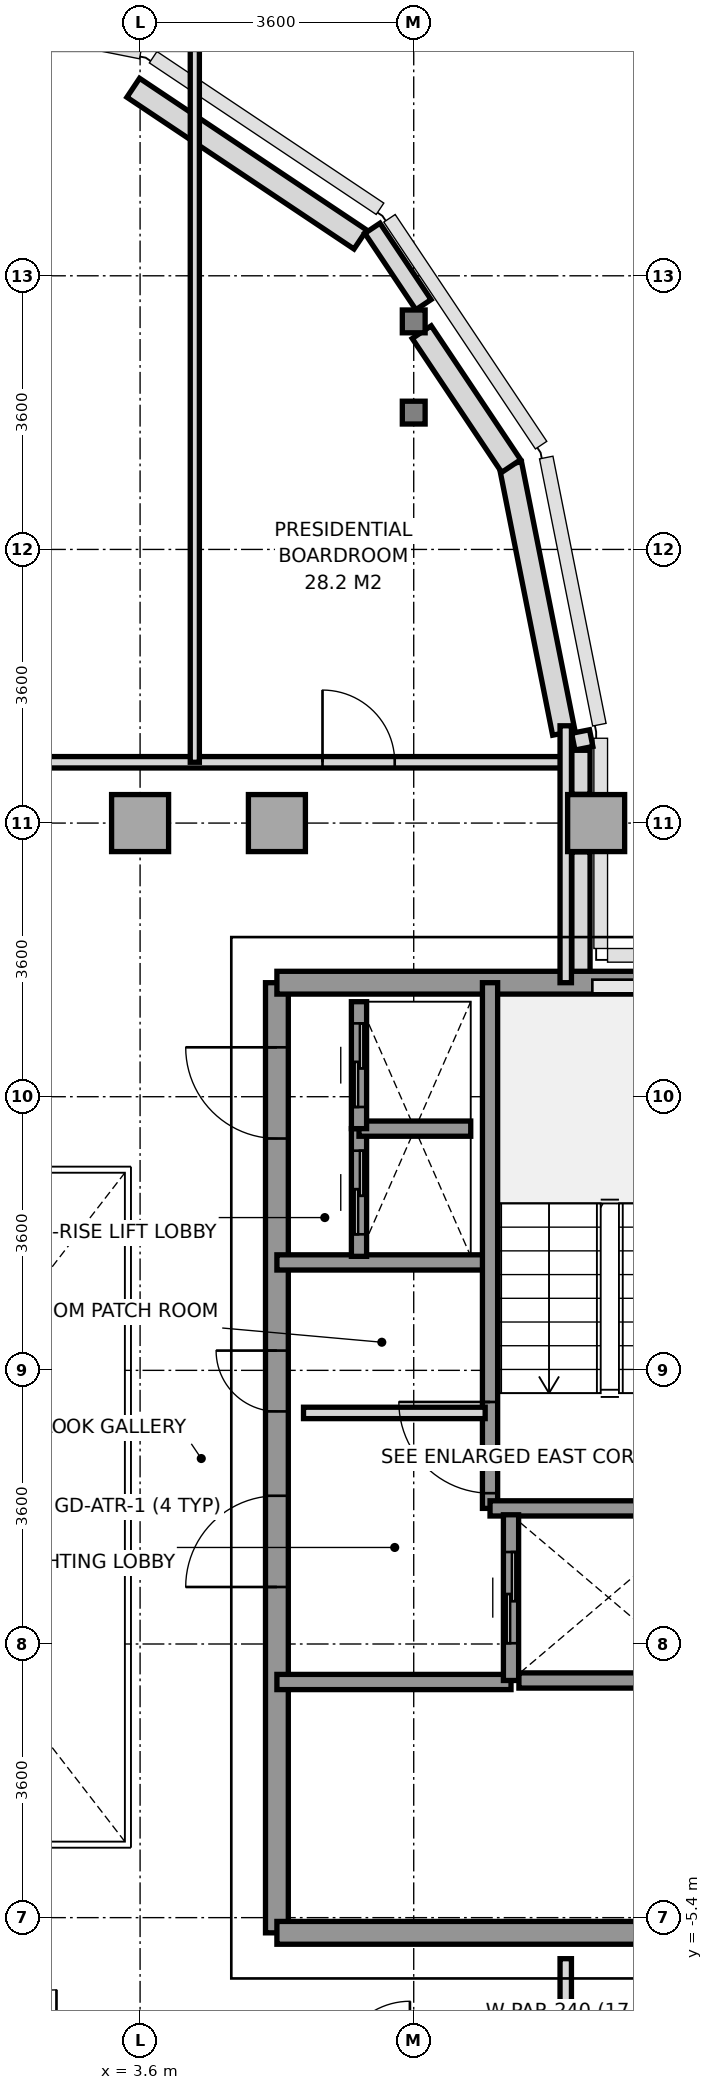
"""IFC4 building model, lengths in metres.
Left out: names, types, materials, properties, quantities, classifications, styles, units other than length and angle.
Written with IfcOpenShell. Run it as: python <this file> out.ifc"""

import sys

from ifc_helpers import new_model, si_unit, direction, frame, frame_2d, origin, origin_2d, place, context, subcontext, project, spatial, rectangle, i_section, extrude, source, transform, mapped, element, fill, save


model = new_model("IFC4")
c1 = context("Model", 3, precision=1e-05, world=origin(), true_north=direction((0.0, 1.0)))
c2 = subcontext(c1, "Body", "Model", "MODEL_VIEW")
j1 = project(units=[si_unit("LENGTHUNIT", "METRE"), si_unit("PLANEANGLEUNIT", "RADIAN")], contexts=[c1])
p1 = place(None, origin())
s1 = spatial("IfcSite", under=j1, at=p1, CompositionType="ELEMENT")
p2 = place(p1, origin())
s2 = spatial("IfcBuilding", under=s1, at=p2, CompositionType="ELEMENT")
p3 = place(p2, frame((0.0, 0.0, 268.4)))
s3 = spatial("IfcBuildingStorey", under=s2, at=p3, CompositionType="ELEMENT", Elevation=268.4)
m1 = source(origin(), c2, "Body", "SweptSolid", [
    extrude(rectangle(XDim=0.75, YDim=0.75, at=origin_2d()), origin(), (0.0, 0.0, 1.0), 2.96),
])
for number, where, z_axis, x_axis in (
    (1, (3.6, 9.0, 0.0), (0.0, 0.0, 1.0), (1.0, 0.0, 0.0)),
    (2, (5.4, 9.0, 0.0), (0.0, 0.0, 1.0), (1.0, 0.0, 0.0)),
):
    element("IfcColumn", number, at=place(p3, frame(where, z_axis=z_axis, x_axis=x_axis)), inside=s3, PredefinedType="COLUMN", context=c2, shape_type="MappedRepresentation", body=[
        mapped(m1, transform((0.0, 0.0, 0.0), x_axis=(1.0, 0.0, 0.0), y_axis=(0.0, 1.0, 0.0), z_axis=(0.0, 0.0, 1.0), scale=1.0)),
    ])
m2 = source(origin(), c2, "Body", "SweptSolid", [
    extrude(i_section(OverallWidth=0.3, OverallDepth=0.3, WebThickness=0.011, FlangeThickness=0.019, at=origin_2d()), origin(), (0.0, 0.0, 1.0), 2.96),
])
for number, where, z_axis, x_axis in (
    (3, (7.2, 14.4, 0.0), (0.0, 0.0, 1.0), (1.0, 0.0, 0.0)),
    (4, (7.2, 15.6, 0.0), (0.0, 0.0, 1.0), (1.0, 0.0, 0.0)),
):
    element("IfcColumn", number, at=place(p3, frame(where, z_axis=z_axis, x_axis=x_axis)), inside=s3, PredefinedType="COLUMN", context=c2, shape_type="MappedRepresentation", body=[
        mapped(m2, transform((0.0, 0.0, 0.0), x_axis=(1.0, 0.0, 0.0), y_axis=(0.0, 1.0, 0.0), z_axis=(0.0, 0.0, 1.0), scale=1.0)),
    ])
p4 = place(p3, frame((9.6, 9.0, 0.0), z_axis=(0.0, 0.0, 1.0), x_axis=(1.0, 0.0, 0.0)))
e5 = element("IfcColumn", 5, at=p4, inside=s3, PredefinedType="COLUMN", context=c2, shape_type="MappedRepresentation", body=[
    mapped(m1, transform((0.0, 0.0, 0.0), x_axis=(1.0, 0.0, 0.0), y_axis=(0.0, 1.0, 0.0), z_axis=(0.0, 0.0, 1.0), scale=1.0)),
])
p5 = place(p3, frame((9.175, 10.185, 0.0), z_axis=(0.0, 0.0, 1.0), x_axis=(-0.195114232679, 0.980780523974, 0.0)))
e6 = element("IfcWall", 6, at=p5, inside=s3, PredefinedType="SOLIDWALL", context=c2, shape_type="SweptSolid", body=[
    extrude(rectangle(XDim=3.609, YDim=0.3, at=frame_2d((1.804, 0.0))), origin(), (0.0, 0.0, 1.0), 2.96),
])
p6 = place(p3, frame((8.482, 13.698, 0.0), z_axis=(0.0, 0.0, 1.0), x_axis=(-0.555604299396, 0.831446848868, 0.0)))
e7 = element("IfcWall", 7, at=p6, inside=s3, PredefinedType="SOLIDWALL", context=c2, shape_type="SweptSolid", body=[
    extrude(rectangle(XDim=2.118, YDim=0.3, at=frame_2d((1.059, 0.0))), origin(), (0.0, 0.0, 1.0), 2.56),
])
p7 = place(p3, frame((6.498, 16.677, 0.0), z_axis=(0.0, 0.0, 1.0), x_axis=(-0.831443568068, 0.555609208993, 0.0)))
e8 = element("IfcWall", 8, at=p7, inside=s3, PredefinedType="SOLIDWALL", context=c2, shape_type="SweptSolid", body=[
    extrude(rectangle(XDim=3.594, YDim=0.3, at=frame_2d((1.797, 0.0))), origin(), (0.0, 0.0, 1.0), 2.96),
])
p8 = place(p3, frame((6.656, 16.825, 0.0), z_axis=(0.0, 0.0, 1.0), x_axis=(0.555585388542, -0.831459485506, 0.0)))
e9 = element("IfcWall", 9, at=p8, inside=s3, PredefinedType="PARAPET", context=c2, shape_type="SweptSolid", body=[
    extrude(rectangle(XDim=1.209, YDim=0.24, at=frame_2d((0.604, 0.0))), origin(), (0.0, 0.0, 1.0), 1.15),
])
p9 = place(p3, frame((9.395, 10.204, 0.0), z_axis=(0.0, 0.0, 1.0), x_axis=(0.194859894132, -0.980831087221, 0.0)))
e10 = element("IfcWall", 10, at=p9, inside=s3, PredefinedType="PARAPET", context=c2, shape_type="SweptSolid", body=[
    extrude(rectangle(XDim=0.224, YDim=0.24, at=frame_2d((0.112, 0.0))), origin(), (0.0, 0.0, 1.0), 1.15),
])
p10 = place(p3, frame((9.4, 9.958, 0.0), z_axis=(0.0, 0.0, 1.0), x_axis=(0.0, -1.0, 0.0)))
e11 = element("IfcWall", 11, at=p10, inside=s3, PredefinedType="PARAPET", context=c2, shape_type="SweptSolid", body=[
    extrude(rectangle(XDim=0.58, YDim=0.24, at=frame_2d((0.29, 0.0))), origin(), (0.0, 0.0, 1.0), 1.15),
])
p11 = place(p3, frame((9.4, 8.622, 0.0), z_axis=(0.0, 0.0, 1.0), x_axis=(0.0, -1.0, 0.0)))
e12 = element("IfcWall", 12, at=p11, inside=s3, PredefinedType="PARAPET", context=c2, shape_type="SweptSolid", body=[
    extrude(rectangle(XDim=1.669, YDim=0.24, at=frame_2d((0.834, 0.0))), origin(), (0.0, 0.0, 1.0), 1.15),
])
p12 = place(p3, frame((5.4, -5.6, 0.0), z_axis=(0.0, 0.0, 1.0), x_axis=(0.0, 1.0, 0.0)))
e13 = element("IfcWall", 13, at=p12, inside=s3, PredefinedType="SHEAR", context=c2, shape_type="SweptSolid", body=[
    extrude(rectangle(XDim=12.5, YDim=0.3, at=frame_2d((6.25, 0.0))), origin(), (0.0, 0.0, 1.0), 2.96),
])
p13 = place(p12, frame((4.55, 0.0, 0.0)))
e14 = element("IfcOpeningElement", 14, at=p13, cuts=e13, PredefinedType="OPENING", context=c2, shape_type="SweptSolid", body=[
    extrude(rectangle(XDim=1.2, YDim=2.2, at=frame_2d((0.6, 1.1))), frame((0.0, 0.16, 0.0), z_axis=(0.0, -1.0, 0.0), x_axis=(1.0, 0.0, 0.0)), (0.0, 0.0, 1.0), 0.32),
])
p14 = place(p12, frame((10.45, 0.0, 0.0)))
e15 = element("IfcOpeningElement", 15, at=p14, cuts=e13, PredefinedType="OPENING", context=c2, shape_type="SweptSolid", body=[
    extrude(rectangle(XDim=1.2, YDim=2.2, at=frame_2d((0.6, 1.1))), frame((0.0, 0.16, 0.0), z_axis=(0.0, -1.0, 0.0), x_axis=(1.0, 0.0, 0.0)), (0.0, 0.0, 1.0), 0.32),
])
p15 = place(p12, frame((6.86, 0.0, 0.0)))
e16 = element("IfcOpeningElement", 16, at=p15, cuts=e13, PredefinedType="OPENING", context=c2, shape_type="SweptSolid", body=[
    extrude(rectangle(XDim=0.8, YDim=2.1, at=frame_2d((0.4, 1.05))), frame((0.0, 0.16, 0.0), z_axis=(0.0, -1.0, 0.0), x_axis=(1.0, 0.0, 0.0)), (0.0, 0.0, 1.0), 0.32),
])
p16 = place(p3, frame((5.4, 6.9, 0.0), z_axis=(0.0, 0.0, 1.0), x_axis=(1.0, 0.0, 0.0)))
e17 = element("IfcWall", 17, at=p16, inside=s3, PredefinedType="SHEAR", context=c2, shape_type="SweptSolid", body=[
    extrude(rectangle(XDim=5.956, YDim=0.3, at=frame_2d((2.978, 0.0))), origin(), (0.0, 0.0, 1.0), 2.96),
])
p17 = place(p3, frame((5.4, -5.6, 0.0), z_axis=(0.0, 0.0, 1.0), x_axis=(1.0, 0.0, 0.0)))
e18 = element("IfcWall", 18, at=p17, inside=s3, PredefinedType="SHEAR", context=c2, shape_type="SweptSolid", body=[
    extrude(rectangle(XDim=7.8, YDim=0.3, at=frame_2d((3.9, 0.0))), origin(), (0.0, 0.0, 1.0), 2.96),
])
p18 = place(p3, frame((5.4, 3.22, 0.0), z_axis=(0.0, 0.0, 1.0), x_axis=(1.0, 0.0, 0.0)))
e19 = element("IfcWall", 19, at=p18, inside=s3, PredefinedType="SOLIDWALL", context=c2, shape_type="SweptSolid", body=[
    extrude(rectangle(XDim=2.78, YDim=0.2, at=frame_2d((1.39, 0.0))), origin(), (0.0, 0.0, 1.0), 2.96),
])
p19 = place(p3, frame((5.4, -2.3, 0.0), z_axis=(0.0, 0.0, 1.0), x_axis=(1.0, 0.0, 0.0)))
e20 = element("IfcWall", 20, at=p19, inside=s3, PredefinedType="SOLIDWALL", context=c2, shape_type="SweptSolid", body=[
    extrude(rectangle(XDim=3.08, YDim=0.2, at=frame_2d((1.54, 0.0))), origin(), (0.0, 0.0, 1.0), 2.96),
])
p20 = place(p3, frame((8.204, -0.016, 0.0), z_axis=(0.0, 0.0, 1.0), x_axis=(0.0, 1.0, 0.0)))
e21 = element("IfcWall", 21, at=p20, inside=s3, PredefinedType="SOLIDWALL", context=c2, shape_type="SweptSolid", body=[
    extrude(rectangle(XDim=6.916, YDim=0.2, at=frame_2d((3.458, 0.0))), origin(), (0.0, 0.0, 1.0), 2.96),
])
p21 = place(p20, frame((0.2, 0.0, 0.0)))
e22 = element("IfcOpeningElement", 22, at=p21, cuts=e21, PredefinedType="OPENING", context=c2, shape_type="SweptSolid", body=[
    extrude(rectangle(XDim=1.2, YDim=2.2, at=frame_2d((0.6, 1.1))), frame((0.0, 0.11, 0.0), z_axis=(0.0, -1.0, 0.0), x_axis=(1.0, 0.0, 0.0)), (0.0, 0.0, 1.0), 0.22),
])
p22 = place(p3, frame((8.204, -0.016, 0.0), z_axis=(0.0, 0.0, 1.0), x_axis=(1.0, 0.0, 0.0)))
e23 = element("IfcWall", 23, at=p22, inside=s3, PredefinedType="SOLIDWALL", context=c2, shape_type="SweptSolid", body=[
    extrude(rectangle(XDim=3.152, YDim=0.2, at=frame_2d((1.576, 0.0))), origin(), (0.0, 0.0, 1.0), 2.96),
])
p23 = place(p3, frame((8.48, -2.28, 0.0), z_axis=(0.0, 0.0, 1.0), x_axis=(0.0, 1.0, 0.0)))
e24 = element("IfcWall", 24, at=p23, inside=s3, PredefinedType="SOLIDWALL", context=c2, shape_type="SweptSolid", body=[
    extrude(rectangle(XDim=2.18, YDim=0.2, at=frame_2d((1.09, 0.0))), origin(), (0.0, 0.0, 1.0), 2.96),
])
p24 = place(p23, frame((0.49, 0.0, 0.0)))
e25 = element("IfcOpeningElement", 25, at=p24, cuts=e24, PredefinedType="OPENING", context=c2, shape_type="SweptSolid", body=[
    extrude(rectangle(XDim=1.2, YDim=2.2, at=frame_2d((0.6, 1.1))), frame((0.0, 0.11, 0.0), z_axis=(0.0, -1.0, 0.0), x_axis=(1.0, 0.0, 0.0)), (0.0, 0.0, 1.0), 0.22),
])
p25 = place(p3, frame((8.584, -2.28, 0.0), z_axis=(0.0, 0.0, 1.0), x_axis=(1.0, 0.0, 0.0)))
e26 = element("IfcWall", 26, at=p25, inside=s3, PredefinedType="SOLIDWALL", context=c2, shape_type="SweptSolid", body=[
    extrude(rectangle(XDim=2.362, YDim=0.2, at=frame_2d((1.181, 0.0))), origin(), (0.0, 0.0, 1.0), 2.96),
])
p26 = place(p3, frame((6.48, 3.3, 0.0), z_axis=(0.0, 0.0, 1.0), x_axis=(0.0, 1.0, 0.0)))
e27 = element("IfcWall", 27, at=p26, inside=s3, PredefinedType="SOLIDWALL", context=c2, shape_type="SweptSolid", body=[
    extrude(rectangle(XDim=1.68, YDim=0.2, at=frame_2d((0.84, 0.0))), origin(), (0.0, 0.0, 1.0), 2.96),
])
p27 = place(p26, frame((0.29, 0.0, 0.0)))
e28 = element("IfcOpeningElement", 28, at=p27, cuts=e27, PredefinedType="OPENING", context=c2, shape_type="SweptSolid", body=[
    extrude(rectangle(XDim=1.1, YDim=2.2, at=frame_2d((0.55, 1.1))), frame((0.0, 0.11, 0.0), z_axis=(0.0, -1.0, 0.0), x_axis=(1.0, 0.0, 0.0)), (0.0, 0.0, 1.0), 0.22),
])
p28 = place(p3, frame((6.48, 4.98, 0.0), z_axis=(0.0, 0.0, 1.0), x_axis=(1.0, 0.0, 0.0)))
e29 = element("IfcWall", 29, at=p28, inside=s3, PredefinedType="SOLIDWALL", context=c2, shape_type="SweptSolid", body=[
    extrude(rectangle(XDim=1.47, YDim=0.2, at=frame_2d((0.735, 0.0))), origin(), (0.0, 0.0, 1.0), 2.96),
])
p29 = place(p3, frame((6.48, 4.98, 0.0), z_axis=(0.0, 0.0, 1.0), x_axis=(0.0, 1.0, 0.0)))
e30 = element("IfcWall", 30, at=p29, inside=s3, PredefinedType="SOLIDWALL", context=c2, shape_type="SweptSolid", body=[
    extrude(rectangle(XDim=1.67, YDim=0.2, at=frame_2d((0.835, 0.0))), origin(), (0.0, 0.0, 1.0), 2.96),
])
p30 = place(p29, frame((0.285, 0.0, 0.0)))
e31 = element("IfcOpeningElement", 31, at=p30, cuts=e30, PredefinedType="OPENING", context=c2, shape_type="SweptSolid", body=[
    extrude(rectangle(XDim=1.1, YDim=2.2, at=frame_2d((0.55, 1.1))), frame((0.0, 0.11, 0.0), z_axis=(0.0, -1.0, 0.0), x_axis=(1.0, 0.0, 0.0)), (0.0, 0.0, 1.0), 0.22),
])
p31 = place(p3, frame((5.75, 1.24, 0.0), z_axis=(0.0, 0.0, 1.0), x_axis=(1.0, 0.0, 0.0)))
e32 = element("IfcWall", 32, at=p31, inside=s3, PredefinedType="PARTITIONING", context=c2, shape_type="SweptSolid", body=[
    extrude(rectangle(XDim=2.39, YDim=0.15, at=frame_2d((1.195, 0.0))), origin(), (0.0, 0.0, 1.0), 2.96),
])
p32 = place(p3, frame((-9.2, 9.8, 0.0), z_axis=(0.0, 0.0, 1.0), x_axis=(1.0, 0.0, 0.0)))
e33 = element("IfcWall", 33, at=p32, inside=s3, PredefinedType="PARTITIONING", context=c2, shape_type="SweptSolid", body=[
    extrude(rectangle(XDim=18.4, YDim=0.15, at=frame_2d((9.2, 0.0))), origin(), (0.0, 0.0, 1.0), 2.96),
])
p33 = place(p32, frame((2.2, 0.0, 0.0)))
e34 = element("IfcOpeningElement", 34, at=p33, cuts=e33, PredefinedType="OPENING", context=c2, shape_type="SweptSolid", body=[
    extrude(rectangle(XDim=0.95, YDim=2.15, at=frame_2d((0.475, 1.075))), frame((0.0, 0.085, 0.0), z_axis=(0.0, -1.0, 0.0), x_axis=(1.0, 0.0, 0.0)), (0.0, 0.0, 1.0), 0.17),
])
p34 = place(p32, frame((8.8, 0.0, 0.0)))
e35 = element("IfcOpeningElement", 35, at=p34, cuts=e33, PredefinedType="OPENING", context=c2, shape_type="SweptSolid", body=[
    extrude(rectangle(XDim=1.1, YDim=2.2, at=frame_2d((0.55, 1.1))), frame((0.0, 0.085, 0.0), z_axis=(0.0, -1.0, 0.0), x_axis=(1.0, 0.0, 0.0)), (0.0, 0.0, 1.0), 0.17),
])
p35 = place(p32, frame((15.2, 0.0, 0.0)))
e36 = element("IfcOpeningElement", 36, at=p35, cuts=e33, PredefinedType="OPENING", context=c2, shape_type="SweptSolid", body=[
    extrude(rectangle(XDim=0.95, YDim=2.15, at=frame_2d((0.475, 1.075))), frame((0.0, 0.085, 0.0), z_axis=(0.0, -1.0, 0.0), x_axis=(1.0, 0.0, 0.0)), (0.0, 0.0, 1.0), 0.17),
])
p36 = place(p3, frame((9.2, 6.9, 0.0), z_axis=(0.0, 0.0, 1.0), x_axis=(0.0, 1.0, 0.0)))
e37 = element("IfcWall", 37, at=p36, inside=s3, PredefinedType="PARTITIONING", context=c2, shape_type="SweptSolid", body=[
    extrude(rectangle(XDim=3.38, YDim=0.15, at=frame_2d((1.69, 0.0))), origin(), (0.0, 0.0, 1.0), 2.56),
])
p37 = place(p3, frame((4.32, 9.8, 0.0), z_axis=(0.0, 0.0, 1.0), x_axis=(0.0, 1.0, 0.0)))
e38 = element("IfcWall", 38, at=p37, inside=s3, PredefinedType="PARTITIONING", context=c2, shape_type="SweptSolid", body=[
    extrude(rectangle(XDim=9.45, YDim=0.12, at=frame_2d((4.725, 0.0))), origin(), (0.0, 0.0, 1.0), 2.56),
])
p38 = place(p3, frame((9.2, -10.28, 0.0), z_axis=(0.0, 0.0, 1.0), x_axis=(0.0, 1.0, 0.0)))
e39 = element("IfcWall", 39, at=p38, inside=s3, PredefinedType="PARTITIONING", context=c2, shape_type="SweptSolid", body=[
    extrude(rectangle(XDim=4.34, YDim=0.15, at=frame_2d((2.17, 0.0))), origin(), (0.0, 0.0, 1.0), 2.56),
])
m3 = source(origin(), c2, "Body", "SweptSolid", [
    extrude(rectangle(XDim=1.2, YDim=2.2, at=frame_2d((0.6, 1.1))), frame((0.0, 0.025, 0.0), z_axis=(0.0, -1.0, 0.0), x_axis=(1.0, 0.0, 0.0)), (0.0, 0.0, 1.0), 0.05),
])
p39 = place(p21, origin())
e40 = element("IfcDoor", 40, at=p39, inside=s3, OperationType="SINGLE_SWING_RIGHT", PredefinedType="DOOR", context=c2, shape_type="MappedRepresentation", body=[
    mapped(m3, transform((0.0, 0.0, 0.0), x_axis=(1.0, 0.0, 0.0), y_axis=(0.0, 1.0, 0.0), z_axis=(0.0, 0.0, 1.0), scale=1.0)),
])
fill(e22, e40)
p40 = place(p13, origin())
e41 = element("IfcDoor", 41, at=p40, inside=s3, OperationType="SINGLE_SWING_LEFT", PredefinedType="DOOR", context=c2, shape_type="MappedRepresentation", body=[
    mapped(m3, transform((0.0, 0.0, 0.0), x_axis=(1.0, 0.0, 0.0), y_axis=(0.0, 1.0, 0.0), z_axis=(0.0, 0.0, 1.0), scale=1.0)),
])
fill(e14, e41)
p41 = place(p14, origin())
e42 = element("IfcDoor", 42, at=p41, inside=s3, OperationType="SINGLE_SWING_RIGHT", PredefinedType="DOOR", context=c2, shape_type="MappedRepresentation", body=[
    mapped(m3, transform((0.0, 0.0, 0.0), x_axis=(1.0, 0.0, 0.0), y_axis=(0.0, 1.0, 0.0), z_axis=(0.0, 0.0, 1.0), scale=1.0)),
])
fill(e15, e42)
m4 = source(origin(), c2, "Body", "SweptSolid", [
    extrude(rectangle(XDim=0.8, YDim=2.1, at=frame_2d((0.4, 1.05))), frame((0.0, 0.025, 0.0), z_axis=(0.0, -1.0, 0.0), x_axis=(1.0, 0.0, 0.0)), (0.0, 0.0, 1.0), 0.05),
])
p42 = place(p15, origin())
e43 = element("IfcDoor", 43, at=p42, inside=s3, OperationType="SINGLE_SWING_RIGHT", PredefinedType="DOOR", context=c2, shape_type="MappedRepresentation", body=[
    mapped(m4, transform((0.0, 0.0, 0.0), x_axis=(1.0, 0.0, 0.0), y_axis=(0.0, 1.0, 0.0), z_axis=(0.0, 0.0, 1.0), scale=1.0)),
])
fill(e16, e43)
p43 = place(p24, origin())
e44 = element("IfcDoor", 44, at=p43, inside=s3, OperationType="SLIDING_TO_RIGHT", PredefinedType="DOOR", context=c2, shape_type="MappedRepresentation", body=[
    mapped(m3, transform((0.0, 0.0, 0.0), x_axis=(1.0, 0.0, 0.0), y_axis=(0.0, 1.0, 0.0), z_axis=(0.0, 0.0, 1.0), scale=1.0)),
])
fill(e25, e44)
m5 = source(origin(), c2, "Body", "SweptSolid", [
    extrude(rectangle(XDim=1.1, YDim=2.2, at=frame_2d((0.55, 1.1))), frame((0.0, 0.025, 0.0), z_axis=(0.0, -1.0, 0.0), x_axis=(1.0, 0.0, 0.0)), (0.0, 0.0, 1.0), 0.05),
])
p44 = place(p27, origin())
e45 = element("IfcDoor", 45, at=p44, inside=s3, OperationType="SLIDING_TO_LEFT", PredefinedType="DOOR", context=c2, shape_type="MappedRepresentation", body=[
    mapped(m5, transform((0.0, 0.0, 0.0), x_axis=(1.0, 0.0, 0.0), y_axis=(0.0, 1.0, 0.0), z_axis=(0.0, 0.0, 1.0), scale=1.0)),
])
fill(e28, e45)
p45 = place(p30, origin())
e46 = element("IfcDoor", 46, at=p45, inside=s3, OperationType="SLIDING_TO_LEFT", PredefinedType="DOOR", context=c2, shape_type="MappedRepresentation", body=[
    mapped(m5, transform((0.0, 0.0, 0.0), x_axis=(1.0, 0.0, 0.0), y_axis=(0.0, 1.0, 0.0), z_axis=(0.0, 0.0, 1.0), scale=1.0)),
])
fill(e31, e46)
m6 = source(origin(), c2, "Body", "SweptSolid", [
    extrude(rectangle(XDim=0.95, YDim=2.15, at=frame_2d((0.475, 1.075))), frame((0.0, 0.025, 0.0), z_axis=(0.0, -1.0, 0.0), x_axis=(1.0, 0.0, 0.0)), (0.0, 0.0, 1.0), 0.05),
])
p46 = place(p35, origin())
e47 = element("IfcDoor", 47, at=p46, inside=s3, OperationType="SINGLE_SWING_LEFT", PredefinedType="DOOR", context=c2, shape_type="MappedRepresentation", body=[
    mapped(m6, transform((0.0, 0.0, 0.0), x_axis=(1.0, 0.0, 0.0), y_axis=(0.0, 1.0, 0.0), z_axis=(0.0, 0.0, 1.0), scale=1.0)),
])
fill(e36, e47)
save(model, sys.argv[1])
